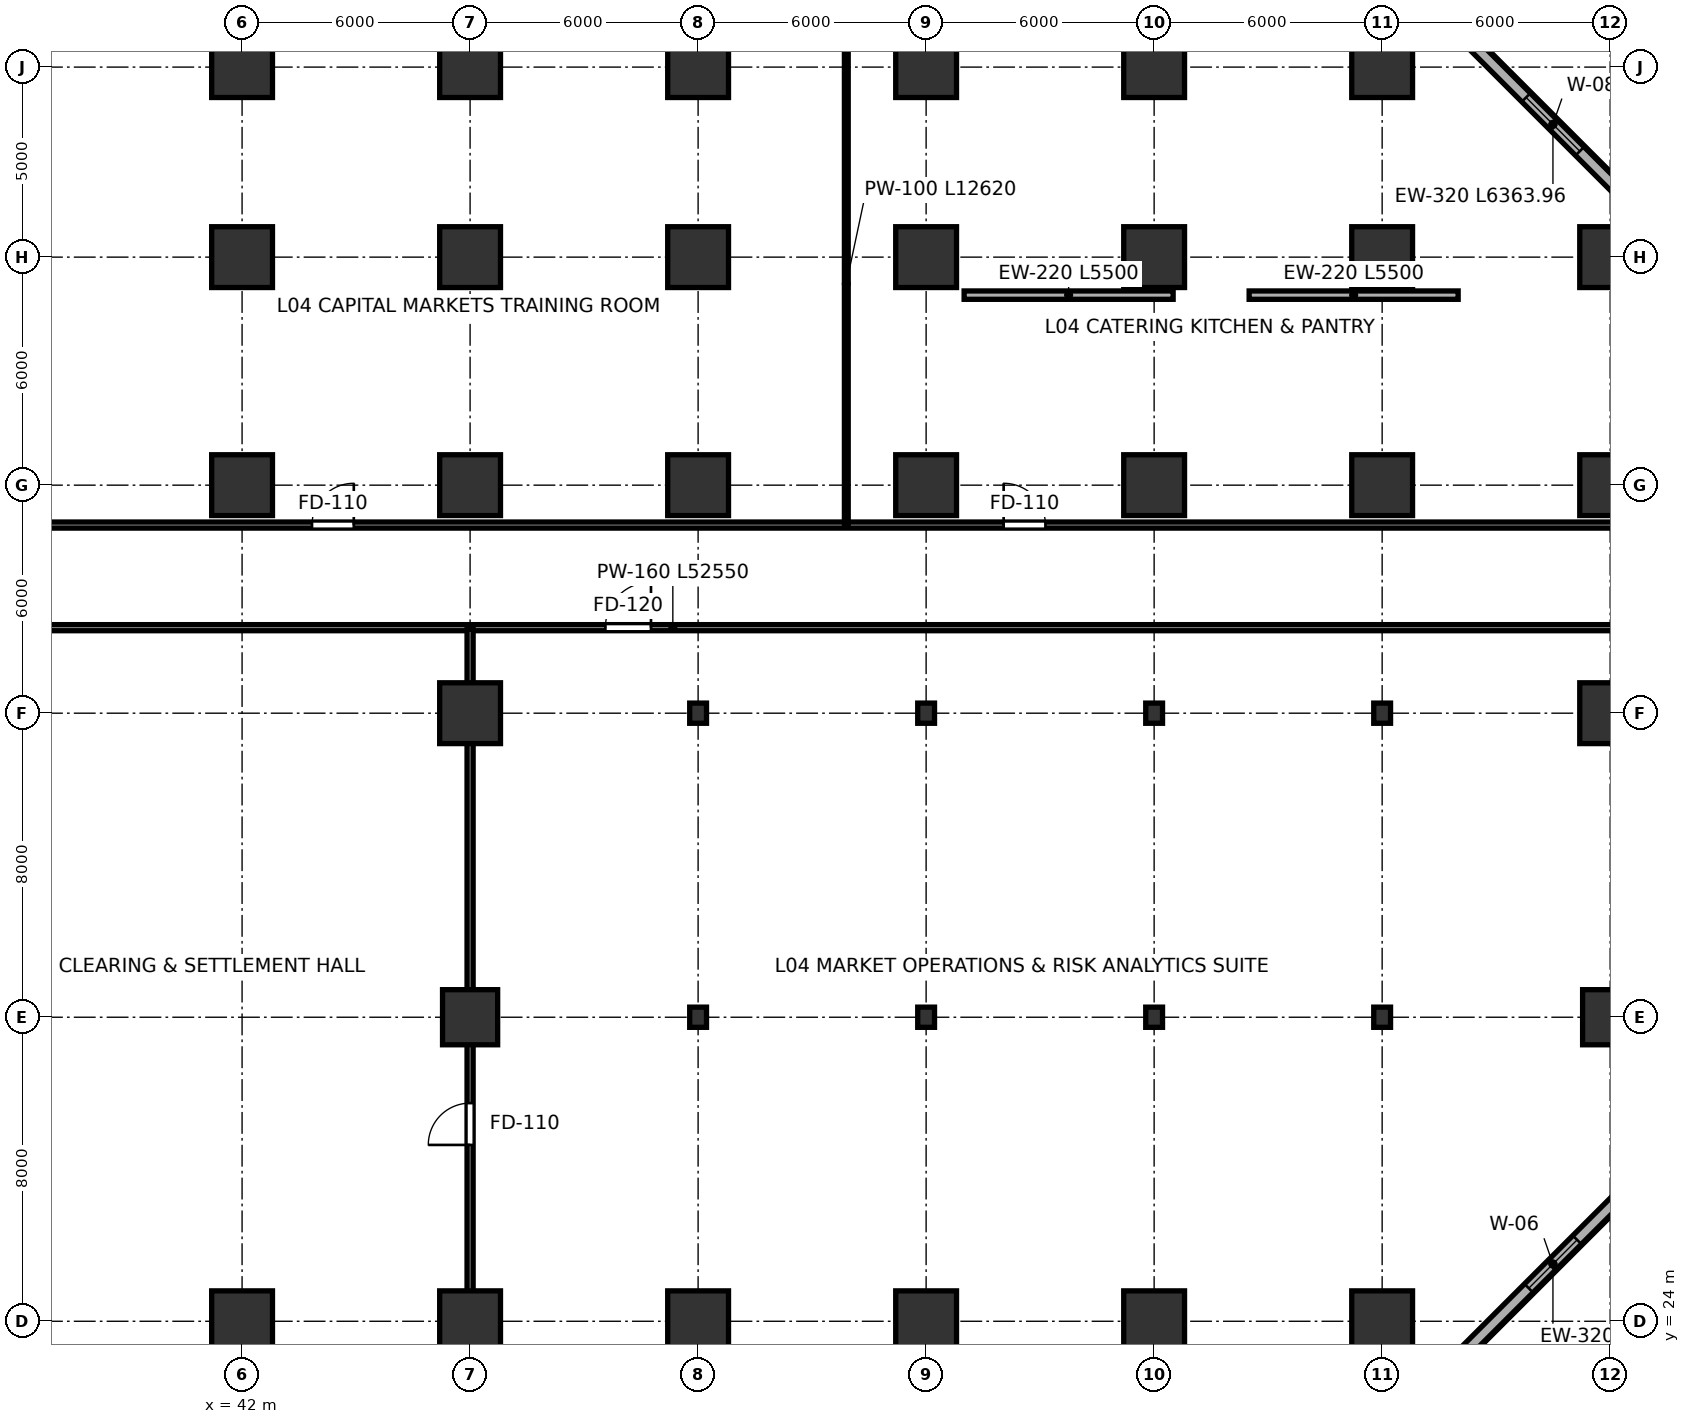
"""IFC4 building model, lengths in metres.
Left out: names, types, materials, properties, quantities, classifications, styles, units other than length and angle.
Written with IfcOpenShell. Run it as: python <this file> out.ifc"""

import sys

from ifc_helpers import new_model, si_unit, direction, frame, frame_2d, origin, origin_2d, place, context, subcontext, project, spatial, rectangle, i_section, extrude, source, transform, mapped, element, fill, save


model = new_model("IFC4")
c1 = context("Model", 3, precision=1e-05, world=origin(), true_north=direction((0.0, 1.0)))
c2 = subcontext(c1, "Body", "Model", "MODEL_VIEW")
j1 = project(units=[si_unit("LENGTHUNIT", "METRE"), si_unit("PLANEANGLEUNIT", "RADIAN")], contexts=[c1])
p1 = place(None, origin())
s1 = spatial("IfcSite", under=j1, at=p1, CompositionType="ELEMENT")
p2 = place(p1, origin())
s2 = spatial("IfcBuilding", under=s1, at=p2, CompositionType="ELEMENT")
p3 = place(p2, frame((0.0, 0.0, 17.4)))
s3 = spatial("IfcBuildingStorey", under=s2, at=p3, CompositionType="ELEMENT", Elevation=17.4)
m1 = source(origin(), c2, "Body", "SweptSolid", [
    extrude(rectangle(XDim=1.6, YDim=1.6, at=origin_2d()), origin(), (0.0, 0.0, 1.0), 4.799),
])
p4 = place(p3, frame((42.0, 24.0, 0.001), z_axis=(0.0, 0.0, 1.0), x_axis=(1.0, 0.0, 0.0)))
e1 = element("IfcColumn", 1, at=p4, inside=s3, PredefinedType="COLUMN", context=c2, shape_type="MappedRepresentation", body=[
    mapped(m1, transform((0.0, 0.0, 0.0), scale=1.0)),
])
m2 = source(origin(), c2, "Body", "SweptSolid", [
    extrude(rectangle(XDim=1.6, YDim=1.6, at=origin_2d()), origin(), (0.0, 0.0, 1.0), 4.799),
])
for number, where, z_axis, x_axis in (
    (2, (42.0, 46.0, 0.001), (0.0, 0.0, 1.0), (1.0, 0.0, 0.0)),
    (3, (42.0, 52.0, 0.001), (0.0, 0.0, 1.0), (1.0, 0.0, 0.0)),
):
    element("IfcColumn", number, at=place(p3, frame(where, z_axis=z_axis, x_axis=x_axis)), inside=s3, PredefinedType="COLUMN", context=c2, shape_type="MappedRepresentation", body=[
        mapped(m2, transform((0.0, 0.0, 0.0), scale=1.0)),
    ])
for number, where, z_axis, x_axis in (
    (4, (42.0, 57.0, 0.001), (0.0, 0.0, 1.0), (1.0, 0.0, 0.0)),
    (5, (48.0, 24.0, 0.001), (0.0, 0.0, 1.0), (1.0, 0.0, 0.0)),
):
    element("IfcColumn", number, at=place(p3, frame(where, z_axis=z_axis, x_axis=x_axis)), inside=s3, PredefinedType="COLUMN", context=c2, shape_type="MappedRepresentation", body=[
        mapped(m1, transform((0.0, 0.0, 0.0), scale=1.0)),
    ])
m3 = source(origin(), c2, "Body", "SweptSolid", [
    extrude(rectangle(XDim=1.45, YDim=1.45, at=origin_2d()), origin(), (0.0, 0.0, 1.0), 4.799),
])
p5 = place(p3, frame((48.0, 32.0, 0.001), z_axis=(0.0, 0.0, 1.0), x_axis=(1.0, 0.0, 0.0)))
e6 = element("IfcColumn", 6, at=p5, inside=s3, PredefinedType="COLUMN", context=c2, shape_type="MappedRepresentation", body=[
    mapped(m3, transform((0.0, 0.0, 0.0), scale=1.0)),
])
for number, where, z_axis, x_axis in (
    (7, (48.0, 40.0, 0.001), (0.0, 0.0, 1.0), (1.0, 0.0, 0.0)),
    (8, (48.0, 46.0, 0.001), (0.0, 0.0, 1.0), (1.0, 0.0, 0.0)),
    (9, (48.0, 52.0, 0.001), (0.0, 0.0, 1.0), (1.0, 0.0, 0.0)),
):
    element("IfcColumn", number, at=place(p3, frame(where, z_axis=z_axis, x_axis=x_axis)), inside=s3, PredefinedType="COLUMN", context=c2, shape_type="MappedRepresentation", body=[
        mapped(m2, transform((0.0, 0.0, 0.0), scale=1.0)),
    ])
for number, where, z_axis, x_axis in (
    (10, (48.0, 57.0, 0.001), (0.0, 0.0, 1.0), (1.0, 0.0, 0.0)),
    (11, (54.0, 24.0, 0.001), (0.0, 0.0, 1.0), (1.0, 0.0, 0.0)),
):
    element("IfcColumn", number, at=place(p3, frame(where, z_axis=z_axis, x_axis=x_axis)), inside=s3, PredefinedType="COLUMN", context=c2, shape_type="MappedRepresentation", body=[
        mapped(m1, transform((0.0, 0.0, 0.0), scale=1.0)),
    ])
m4 = source(origin(), c2, "Body", "SweptSolid", [
    extrude(i_section(OverallWidth=0.442, OverallDepth=0.531, WebThickness=0.066, FlangeThickness=0.106, FilletRadius=0.015, at=origin_2d()), origin(), (0.0, 0.0, 1.0), 4.799),
])
for number, where, z_axis, x_axis in (
    (12, (54.0, 32.0, 0.001), (0.0, 0.0, 1.0), (1.0, 0.0, 0.0)),
    (13, (54.0, 40.0, 0.001), (0.0, 0.0, 1.0), (1.0, 0.0, 0.0)),
):
    element("IfcColumn", number, at=place(p3, frame(where, z_axis=z_axis, x_axis=x_axis)), inside=s3, PredefinedType="COLUMN", context=c2, shape_type="MappedRepresentation", body=[
        mapped(m4, transform((0.0, 0.0, 0.0), scale=1.0)),
    ])
for number, where, z_axis, x_axis in (
    (14, (54.0, 46.0, 0.001), (0.0, 0.0, 1.0), (1.0, 0.0, 0.0)),
    (15, (54.0, 52.0, 0.001), (0.0, 0.0, 1.0), (1.0, 0.0, 0.0)),
):
    element("IfcColumn", number, at=place(p3, frame(where, z_axis=z_axis, x_axis=x_axis)), inside=s3, PredefinedType="COLUMN", context=c2, shape_type="MappedRepresentation", body=[
        mapped(m2, transform((0.0, 0.0, 0.0), scale=1.0)),
    ])
for number, where, z_axis, x_axis in (
    (16, (54.0, 57.0, 0.001), (0.0, 0.0, 1.0), (1.0, 0.0, 0.0)),
    (17, (60.0, 24.0, 0.001), (0.0, 0.0, 1.0), (1.0, 0.0, 0.0)),
):
    element("IfcColumn", number, at=place(p3, frame(where, z_axis=z_axis, x_axis=x_axis)), inside=s3, PredefinedType="COLUMN", context=c2, shape_type="MappedRepresentation", body=[
        mapped(m1, transform((0.0, 0.0, 0.0), scale=1.0)),
    ])
for number, where, z_axis, x_axis in (
    (18, (60.0, 32.0, 0.001), (0.0, 0.0, 1.0), (1.0, 0.0, 0.0)),
    (19, (60.0, 40.0, 0.001), (0.0, 0.0, 1.0), (1.0, 0.0, 0.0)),
):
    element("IfcColumn", number, at=place(p3, frame(where, z_axis=z_axis, x_axis=x_axis)), inside=s3, PredefinedType="COLUMN", context=c2, shape_type="MappedRepresentation", body=[
        mapped(m4, transform((0.0, 0.0, 0.0), scale=1.0)),
    ])
for number, where, z_axis, x_axis in (
    (20, (60.0, 46.0, 0.001), (0.0, 0.0, 1.0), (1.0, 0.0, 0.0)),
    (21, (60.0, 52.0, 0.001), (0.0, 0.0, 1.0), (1.0, 0.0, 0.0)),
):
    element("IfcColumn", number, at=place(p3, frame(where, z_axis=z_axis, x_axis=x_axis)), inside=s3, PredefinedType="COLUMN", context=c2, shape_type="MappedRepresentation", body=[
        mapped(m2, transform((0.0, 0.0, 0.0), scale=1.0)),
    ])
for number, where, z_axis, x_axis in (
    (22, (60.0, 57.0, 0.001), (0.0, 0.0, 1.0), (1.0, 0.0, 0.0)),
    (23, (66.0, 24.0, 0.001), (0.0, 0.0, 1.0), (1.0, 0.0, 0.0)),
):
    element("IfcColumn", number, at=place(p3, frame(where, z_axis=z_axis, x_axis=x_axis)), inside=s3, PredefinedType="COLUMN", context=c2, shape_type="MappedRepresentation", body=[
        mapped(m1, transform((0.0, 0.0, 0.0), scale=1.0)),
    ])
for number, where, z_axis, x_axis in (
    (24, (66.0, 32.0, 0.001), (0.0, 0.0, 1.0), (1.0, 0.0, 0.0)),
    (25, (66.0, 40.0, 0.001), (0.0, 0.0, 1.0), (1.0, 0.0, 0.0)),
):
    element("IfcColumn", number, at=place(p3, frame(where, z_axis=z_axis, x_axis=x_axis)), inside=s3, PredefinedType="COLUMN", context=c2, shape_type="MappedRepresentation", body=[
        mapped(m4, transform((0.0, 0.0, 0.0), scale=1.0)),
    ])
for number, where, z_axis, x_axis in (
    (26, (66.0, 46.0, 0.001), (0.0, 0.0, 1.0), (1.0, 0.0, 0.0)),
    (27, (66.0, 52.0, 0.001), (0.0, 0.0, 1.0), (1.0, 0.0, 0.0)),
):
    element("IfcColumn", number, at=place(p3, frame(where, z_axis=z_axis, x_axis=x_axis)), inside=s3, PredefinedType="COLUMN", context=c2, shape_type="MappedRepresentation", body=[
        mapped(m2, transform((0.0, 0.0, 0.0), scale=1.0)),
    ])
for number, where, z_axis, x_axis in (
    (28, (66.0, 57.0, 0.001), (0.0, 0.0, 1.0), (1.0, 0.0, 0.0)),
    (29, (72.0, 24.0, 0.001), (0.0, 0.0, 1.0), (1.0, 0.0, 0.0)),
):
    element("IfcColumn", number, at=place(p3, frame(where, z_axis=z_axis, x_axis=x_axis)), inside=s3, PredefinedType="COLUMN", context=c2, shape_type="MappedRepresentation", body=[
        mapped(m1, transform((0.0, 0.0, 0.0), scale=1.0)),
    ])
for number, where, z_axis, x_axis in (
    (30, (72.0, 32.0, 0.001), (0.0, 0.0, 1.0), (1.0, 0.0, 0.0)),
    (31, (72.0, 40.0, 0.001), (0.0, 0.0, 1.0), (1.0, 0.0, 0.0)),
):
    element("IfcColumn", number, at=place(p3, frame(where, z_axis=z_axis, x_axis=x_axis)), inside=s3, PredefinedType="COLUMN", context=c2, shape_type="MappedRepresentation", body=[
        mapped(m4, transform((0.0, 0.0, 0.0), scale=1.0)),
    ])
for number, where, z_axis, x_axis in (
    (32, (72.0, 46.0, 0.001), (0.0, 0.0, 1.0), (1.0, 0.0, 0.0)),
    (33, (72.0, 52.0, 0.001), (0.0, 0.0, 1.0), (1.0, 0.0, 0.0)),
):
    element("IfcColumn", number, at=place(p3, frame(where, z_axis=z_axis, x_axis=x_axis)), inside=s3, PredefinedType="COLUMN", context=c2, shape_type="MappedRepresentation", body=[
        mapped(m2, transform((0.0, 0.0, 0.0), scale=1.0)),
    ])
p6 = place(p3, frame((72.0, 57.0, 0.001), z_axis=(0.0, 0.0, 1.0), x_axis=(1.0, 0.0, 0.0)))
e34 = element("IfcColumn", 34, at=p6, inside=s3, PredefinedType="COLUMN", context=c2, shape_type="MappedRepresentation", body=[
    mapped(m1, transform((0.0, 0.0, 0.0), scale=1.0)),
])
m5 = source(origin(), c2, "Body", "SweptSolid", [
    extrude(rectangle(XDim=1.45, YDim=1.45, at=origin_2d()), origin(), (0.0, 0.0, 1.0), 4.799),
])
p7 = place(p3, frame((78.0, 32.0, 0.001), z_axis=(0.0, 0.0, 1.0), x_axis=(1.0, 0.0, 0.0)))
e35 = element("IfcColumn", 35, at=p7, inside=s3, PredefinedType="COLUMN", context=c2, shape_type="MappedRepresentation", body=[
    mapped(m5, transform((0.0, 0.0, 0.0), scale=1.0)),
])
for number, where, z_axis, x_axis in (
    (36, (78.0, 40.0, 0.001), (0.0, 0.0, 1.0), (1.0, 0.0, 0.0)),
    (37, (78.0, 46.0, 0.001), (0.0, 0.0, 1.0), (1.0, 0.0, 0.0)),
    (38, (78.0, 52.0, 0.001), (0.0, 0.0, 1.0), (1.0, 0.0, 0.0)),
):
    element("IfcColumn", number, at=place(p3, frame(where, z_axis=z_axis, x_axis=x_axis)), inside=s3, PredefinedType="COLUMN", context=c2, shape_type="MappedRepresentation", body=[
        mapped(m1, transform((0.0, 0.0, 0.0), scale=1.0)),
    ])
for number, where, z_axis, x_axis in (
    (39, (61.0, 51.0, 0.0), (0.0, 0.0, 1.0), (1.0, 0.0, 0.0)),
    (40, (68.5, 51.0, 0.0), (0.0, 0.0, 1.0), (1.0, 0.0, 0.0)),
):
    element("IfcWall", number, at=place(p3, frame(where, z_axis=z_axis, x_axis=x_axis)), inside=s3, PredefinedType="SOLIDWALL", context=c2, shape_type="SweptSolid", body=[
        extrude(rectangle(XDim=5.5, YDim=0.22, at=frame_2d((2.75, 0.0))), origin(), (0.0, 0.0, 1.0), 2.8),
    ])
p8 = place(p3, frame((74.244, 23.256, 0.0), z_axis=(0.0, 0.0, 1.0), x_axis=(0.707106781187, 0.707106781187, 0.0)))
e41 = element("IfcWall", 41, at=p8, inside=s3, PredefinedType="SOLIDWALL", context=c2, shape_type="SweptSolid", body=[
    extrude(rectangle(XDim=6.364, YDim=0.32, at=frame_2d((3.182, 0.0))), origin(), (0.0, 0.0, 1.0), 4.54),
])
p9 = place(p8, frame((2.282, 0.0, 0.65)))
e42 = element("IfcOpeningElement", 42, at=p9, cuts=e41, PredefinedType="OPENING", context=c2, shape_type="SweptSolid", body=[
    extrude(rectangle(XDim=1.8, YDim=2.1, at=frame_2d((0.9, 1.05))), frame((0.0, 0.17, 0.0), z_axis=(0.0, -1.0, 0.0), x_axis=(1.0, 0.0, 0.0)), (0.0, 0.0, 1.0), 0.34),
])
p10 = place(p3, frame((78.744, 53.244, 0.0), z_axis=(0.0, 0.0, 1.0), x_axis=(-0.707106781187, 0.707106781187, 0.0)))
e43 = element("IfcWall", 43, at=p10, inside=s3, PredefinedType="SOLIDWALL", context=c2, shape_type="SweptSolid", body=[
    extrude(rectangle(XDim=6.364, YDim=0.32, at=frame_2d((3.182, 0.0))), origin(), (0.0, 0.0, 1.0), 4.54),
])
p11 = place(p10, frame((2.182, 0.0, 0.65)))
e44 = element("IfcOpeningElement", 44, at=p11, cuts=e43, PredefinedType="OPENING", context=c2, shape_type="SweptSolid", body=[
    extrude(rectangle(XDim=2.0, YDim=2.25, at=frame_2d((1.0, 1.125))), frame((0.0, 0.17, 0.0), z_axis=(0.0, -1.0, 0.0), x_axis=(1.0, 0.0, 0.0)), (0.0, 0.0, 1.0), 0.34),
])
p12 = place(p3, frame((27.06, 42.25, 0.0), z_axis=(0.0, 0.0, 1.0), x_axis=(1.0, 0.0, 0.0)))
e45 = element("IfcWall", 45, at=p12, inside=s3, PredefinedType="PARTITIONING", context=c2, shape_type="SweptSolid", body=[
    extrude(rectangle(XDim=52.55, YDim=0.16, at=frame_2d((26.275, 0.0))), origin(), (0.0, 0.0, 1.0), 3.675),
])
p13 = place(p12, frame((6.5, 0.0, 0.0)))
e46 = element("IfcOpeningElement", 46, at=p13, cuts=e45, PredefinedType="OPENING", context=c2, shape_type="SweptSolid", body=[
    extrude(rectangle(XDim=1.2, YDim=2.2, at=frame_2d((0.6, 1.1))), frame((0.0, 0.09, 0.0), z_axis=(0.0, -1.0, 0.0), x_axis=(1.0, 0.0, 0.0)), (0.0, 0.0, 1.0), 0.18),
])
p14 = place(p12, frame((24.5, 0.0, 0.0)))
e47 = element("IfcOpeningElement", 47, at=p14, cuts=e45, PredefinedType="OPENING", context=c2, shape_type="SweptSolid", body=[
    extrude(rectangle(XDim=1.2, YDim=2.2, at=frame_2d((0.6, 1.1))), frame((0.0, 0.09, 0.0), z_axis=(0.0, -1.0, 0.0), x_axis=(1.0, 0.0, 0.0)), (0.0, 0.0, 1.0), 0.18),
])
p15 = place(p3, frame((27.14, 44.95, 0.0), z_axis=(0.0, 0.0, 1.0), x_axis=(1.0, 0.0, 0.0)))
e48 = element("IfcWall", 48, at=p15, inside=s3, PredefinedType="PARTITIONING", context=c2, shape_type="SweptSolid", body=[
    extrude(rectangle(XDim=52.47, YDim=0.16, at=frame_2d((26.235, 0.0))), origin(), (0.0, 0.0, 1.0), 3.675),
])
p16 = place(p15, frame((16.7, 0.0, 0.0)))
e49 = element("IfcOpeningElement", 49, at=p16, cuts=e48, PredefinedType="OPENING", context=c2, shape_type="SweptSolid", body=[
    extrude(rectangle(XDim=1.1, YDim=2.2, at=frame_2d((0.55, 1.1))), frame((0.0, 0.09, 0.0), z_axis=(0.0, -1.0, 0.0), x_axis=(1.0, 0.0, 0.0)), (0.0, 0.0, 1.0), 0.18),
])
p17 = place(p15, frame((34.9, 0.0, 0.0)))
e50 = element("IfcOpeningElement", 50, at=p17, cuts=e48, PredefinedType="OPENING", context=c2, shape_type="SweptSolid", body=[
    extrude(rectangle(XDim=1.1, YDim=2.2, at=frame_2d((0.55, 1.1))), frame((0.0, 0.09, 0.0), z_axis=(0.0, -1.0, 0.0), x_axis=(1.0, 0.0, 0.0)), (0.0, 0.0, 1.0), 0.18),
])
p18 = place(p3, frame((57.9, 44.99, 0.0), z_axis=(0.0, 0.0, 1.0), x_axis=(0.0, 1.0, 0.0)))
e51 = element("IfcWall", 51, at=p18, inside=s3, PredefinedType="PARTITIONING", context=c2, shape_type="SweptSolid", body=[
    extrude(rectangle(XDim=12.62, YDim=0.1, at=frame_2d((6.31, 0.0))), origin(), (0.0, 0.0, 1.0), 3.675),
])
p19 = place(p3, frame((48.0, 24.44, 0.0), z_axis=(0.0, 0.0, 1.0), x_axis=(0.0, 1.0, 0.0)))
e52 = element("IfcWall", 52, at=p19, inside=s3, PredefinedType="PARTITIONING", context=c2, shape_type="SweptSolid", body=[
    extrude(rectangle(XDim=17.77, YDim=0.16, at=frame_2d((8.885, 0.0))), origin(), (0.0, 0.0, 1.0), 3.175),
])
p20 = place(p19, frame((4.2, 0.0, 0.0)))
e53 = element("IfcOpeningElement", 53, at=p20, cuts=e52, PredefinedType="OPENING", context=c2, shape_type="SweptSolid", body=[
    extrude(rectangle(XDim=1.1, YDim=2.2, at=frame_2d((0.55, 1.1))), frame((0.0, 0.09, 0.0), z_axis=(0.0, -1.0, 0.0), x_axis=(1.0, 0.0, 0.0)), (0.0, 0.0, 1.0), 0.18),
])
m6 = source(origin(), c2, "Body", "SweptSolid", [
    extrude(rectangle(XDim=1.8, YDim=2.1, at=frame_2d((0.9, 1.05))), frame((0.0, 0.03, 0.0), z_axis=(0.0, -1.0, 0.0), x_axis=(1.0, 0.0, 0.0)), (0.0, 0.0, 1.0), 0.06),
])
p21 = place(p9, origin())
e54 = element("IfcWindow", 54, at=p21, inside=s3, PartitioningType="SINGLE_PANEL", PredefinedType="WINDOW", context=c2, shape_type="MappedRepresentation", body=[
    mapped(m6, transform((0.0, 0.0, 0.0), scale=1.0)),
])
fill(e42, e54)
m7 = source(origin(), c2, "Body", "SweptSolid", [
    extrude(rectangle(XDim=2.0, YDim=2.25, at=frame_2d((1.0, 1.125))), frame((0.0, 0.03, 0.0), z_axis=(0.0, -1.0, 0.0), x_axis=(1.0, 0.0, 0.0)), (0.0, 0.0, 1.0), 0.06),
])
p22 = place(p11, origin())
e55 = element("IfcWindow", 55, at=p22, inside=s3, PartitioningType="DOUBLE_PANEL_HORIZONTAL", PredefinedType="WINDOW", context=c2, shape_type="MappedRepresentation", body=[
    mapped(m7, transform((0.0, 0.0, 0.0), scale=1.0)),
])
fill(e44, e55)
m8 = source(origin(), c2, "Body", "SweptSolid", [
    extrude(rectangle(XDim=1.2, YDim=2.2, at=frame_2d((0.6, 1.1))), frame((0.0, 0.025, 0.0), z_axis=(0.0, -1.0, 0.0), x_axis=(1.0, 0.0, 0.0)), (0.0, 0.0, 1.0), 0.05),
])
p23 = place(p14, origin())
e56 = element("IfcDoor", 56, at=p23, inside=s3, OperationType="SINGLE_SWING_RIGHT", PredefinedType="DOOR", context=c2, shape_type="MappedRepresentation", body=[
    mapped(m8, transform((0.0, 0.0, 0.0), scale=1.0)),
])
fill(e47, e56)
m9 = source(origin(), c2, "Body", "SweptSolid", [
    extrude(rectangle(XDim=1.1, YDim=2.2, at=frame_2d((0.55, 1.1))), frame((0.0, 0.025, 0.0), z_axis=(0.0, -1.0, 0.0), x_axis=(1.0, 0.0, 0.0)), (0.0, 0.0, 1.0), 0.05),
])
p24 = place(p16, origin())
e57 = element("IfcDoor", 57, at=p24, inside=s3, OperationType="SINGLE_SWING_RIGHT", PredefinedType="DOOR", context=c2, shape_type="MappedRepresentation", body=[
    mapped(m9, transform((0.0, 0.0, 0.0), scale=1.0)),
])
fill(e49, e57)
p25 = place(p17, origin())
e58 = element("IfcDoor", 58, at=p25, inside=s3, OperationType="SINGLE_SWING_LEFT", PredefinedType="DOOR", context=c2, shape_type="MappedRepresentation", body=[
    mapped(m9, transform((0.0, 0.0, 0.0), scale=1.0)),
])
fill(e50, e58)
p26 = place(p20, origin())
e59 = element("IfcDoor", 59, at=p26, inside=s3, OperationType="SINGLE_SWING_LEFT", PredefinedType="DOOR", context=c2, shape_type="MappedRepresentation", body=[
    mapped(m9, transform((0.0, 0.0, 0.0), scale=1.0)),
])
fill(e53, e59)
save(model, sys.argv[1])
